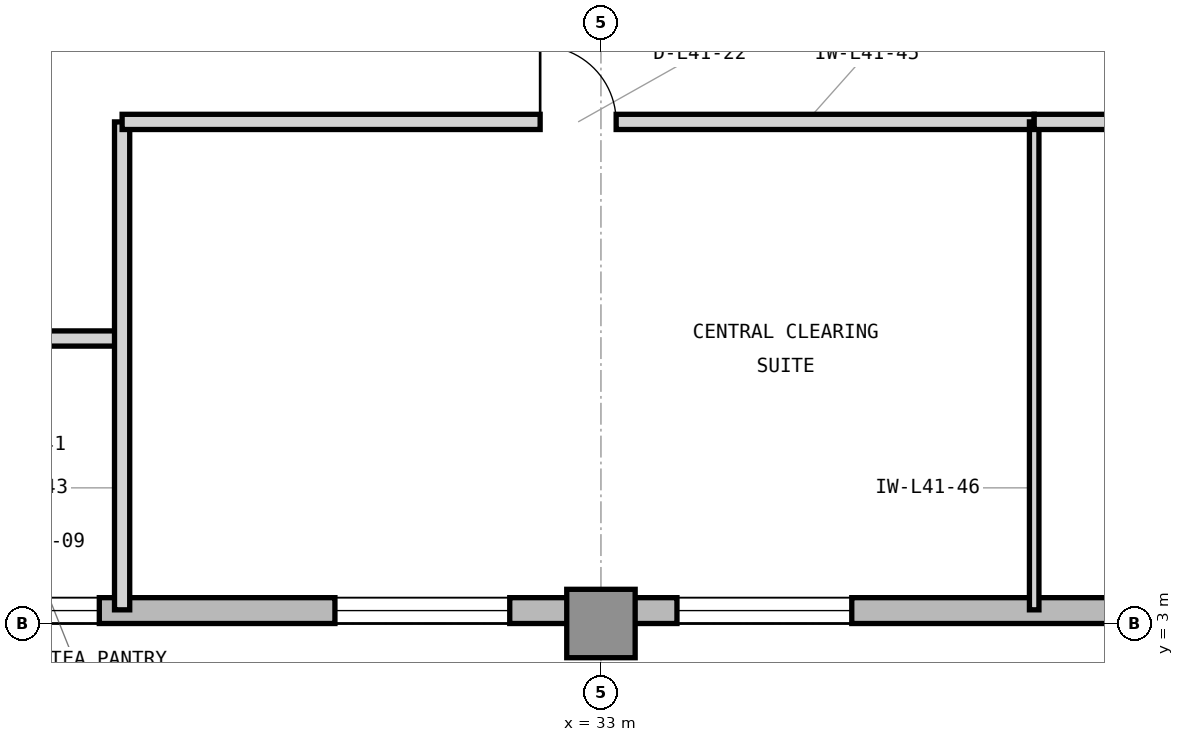
"""IFC4 building model, lengths in metres.
Left out: names, types, materials, properties, quantities, classifications, styles, units other than length and angle.
Written with IfcOpenShell. Run it as: python <this file> out.ifc"""

import sys

from ifc_helpers import new_model, si_unit, direction, frame, frame_2d, origin, origin_2d, place, context, subcontext, project, spatial, rectangle, extrude, element, fill, save


model = new_model("IFC4")
c1 = context("Model", 3, precision=1e-05, world=origin(), true_north=direction((0.0, 1.0)))
c2 = subcontext(c1, "Body", "Model", "MODEL_VIEW")
j1 = project(units=[si_unit("LENGTHUNIT", "METRE"), si_unit("PLANEANGLEUNIT", "RADIAN")], contexts=[c1])
p1 = place(None, origin())
s1 = spatial("IfcSite", under=j1, at=p1, CompositionType="ELEMENT")
p2 = place(p1, origin())
s2 = spatial("IfcBuilding", under=s1, at=p2, CompositionType="ELEMENT")
p3 = place(p2, frame((0.0, 0.0, 172.2)))
s3 = spatial("IfcBuildingStorey", under=s2, at=p3, CompositionType="ELEMENT", Elevation=172.2)
p4 = place(p3, frame((33.0, 3.0, 0.0), z_axis=(0.0, 0.0, 1.0), x_axis=(1.0, 0.0, 0.0)))
e1 = element("IfcColumn", 1, at=p4, inside=s3, PredefinedType="COLUMN", context=c2, shape_type="SweptSolid", body=[
    extrude(rectangle(XDim=0.9, YDim=0.9, at=origin_2d()), origin(), (0.0, 0.0, 1.0), 3.9),
])
p5 = place(p3, frame((23.9, 3.17, 0.0), z_axis=(0.0, 0.0, 1.0), x_axis=(1.0, 0.0, 0.0)))
e2 = element("IfcWall", 2, at=p5, inside=s3, PredefinedType="STANDARD", context=c2, shape_type="SweptSolid", body=[
    extrude(rectangle(XDim=31.5, YDim=0.34, at=frame_2d((15.75, 0.0))), origin(), (0.0, 0.0, 1.0), 3.7),
])
p6 = place(p5, frame((5.6, 0.0, 0.9)))
e3 = element("IfcOpeningElement", 3, at=p6, cuts=e2, PredefinedType="OPENING", context=c2, shape_type="SweptSolid", body=[
    extrude(rectangle(XDim=2.3, YDim=2.2, at=frame_2d((1.15, 1.1))), frame((0.0, 0.18, 0.0), z_axis=(0.0, -1.0, 0.0), x_axis=(1.0, 0.0, 0.0)), (0.0, 0.0, 1.0), 0.36),
])
p7 = place(p5, frame((10.1, 0.0, 0.9)))
e4 = element("IfcOpeningElement", 4, at=p7, cuts=e2, PredefinedType="OPENING", context=c2, shape_type="SweptSolid", body=[
    extrude(rectangle(XDim=2.3, YDim=2.2, at=frame_2d((1.15, 1.1))), frame((0.0, 0.18, 0.0), z_axis=(0.0, -1.0, 0.0), x_axis=(1.0, 0.0, 0.0)), (0.0, 0.0, 1.0), 0.36),
])
p8 = place(p5, frame((19.1, 0.0, 0.9)))
e5 = element("IfcOpeningElement", 5, at=p8, cuts=e2, PredefinedType="OPENING", context=c2, shape_type="SweptSolid", body=[
    extrude(rectangle(XDim=2.3, YDim=2.2, at=frame_2d((1.15, 1.1))), frame((0.0, 0.18, 0.0), z_axis=(0.0, -1.0, 0.0), x_axis=(1.0, 0.0, 0.0)), (0.0, 0.0, 1.0), 0.36),
])
p9 = place(p5, frame((0.9, 0.0, 0.9)))
e6 = element("IfcOpeningElement", 6, at=p9, cuts=e2, PredefinedType="OPENING", context=c2, shape_type="SweptSolid", body=[
    extrude(rectangle(XDim=1.6, YDim=2.2, at=frame_2d((0.8, 1.1))), frame((0.0, 0.18, 0.0), z_axis=(0.0, -1.0, 0.0), x_axis=(1.0, 0.0, 0.0)), (0.0, 0.0, 1.0), 0.36),
])
p10 = place(p3, frame((23.85, 6.75, 0.0), z_axis=(0.0, 0.0, 1.0), x_axis=(1.0, 0.0, 0.0)))
e7 = element("IfcWall", 7, at=p10, inside=s3, PredefinedType="PARTITIONING", context=c2, shape_type="SweptSolid", body=[
    extrude(rectangle(XDim=2.85, YDim=0.2, at=frame_2d((1.425, 0.0))), origin(), (0.0, 0.0, 1.0), 3.69),
])
p11 = place(p10, frame((0.7, 0.0, 0.0)))
e8 = element("IfcOpeningElement", 8, at=p11, cuts=e7, PredefinedType="OPENING", context=c2, shape_type="SweptSolid", body=[
    extrude(rectangle(XDim=1.0, YDim=2.15, at=frame_2d((0.5, 1.075))), frame((0.0, 0.11, 0.0), z_axis=(0.0, -1.0, 0.0), x_axis=(1.0, 0.0, 0.0)), (0.0, 0.0, 1.0), 0.22),
])
p12 = place(p3, frame((26.7, 3.18, 0.0), z_axis=(0.0, 0.0, 1.0), x_axis=(0.0, 1.0, 0.0)))
e9 = element("IfcWall", 9, at=p12, inside=s3, PredefinedType="PARTITIONING", context=c2, shape_type="SweptSolid", body=[
    extrude(rectangle(XDim=6.42, YDim=0.2, at=frame_2d((3.21, 0.0))), origin(), (0.0, 0.0, 1.0), 3.69),
])
p13 = place(p3, frame((26.7, 9.6, 0.0), z_axis=(0.0, 0.0, 1.0), x_axis=(1.0, 0.0, 0.0)))
e10 = element("IfcWall", 10, at=p13, inside=s3, PredefinedType="PARTITIONING", context=c2, shape_type="SweptSolid", body=[
    extrude(rectangle(XDim=12.0, YDim=0.2, at=frame_2d((6.0, 0.0))), origin(), (0.0, 0.0, 1.0), 3.69),
])
p14 = place(p13, frame((5.5, 0.0, 0.0)))
e11 = element("IfcOpeningElement", 11, at=p14, cuts=e10, PredefinedType="OPENING", context=c2, shape_type="SweptSolid", body=[
    extrude(rectangle(XDim=1.0, YDim=2.15, at=frame_2d((0.5, 1.075))), frame((0.0, 0.11, 0.0), z_axis=(0.0, -1.0, 0.0), x_axis=(1.0, 0.0, 0.0)), (0.0, 0.0, 1.0), 0.22),
])
p15 = place(p3, frame((38.7, 3.18, 0.0), z_axis=(0.0, 0.0, 1.0), x_axis=(0.0, 1.0, 0.0)))
e12 = element("IfcWall", 12, at=p15, inside=s3, PredefinedType="PARTITIONING", context=c2, shape_type="SweptSolid", body=[
    extrude(rectangle(XDim=6.42, YDim=0.125, at=frame_2d((3.21, 0.0))), origin(), (0.0, 0.0, 1.0), 3.69),
])
p16 = place(p3, frame((38.7, 9.6, 0.0), z_axis=(0.0, 0.0, 1.0), x_axis=(1.0, 0.0, 0.0)))
e13 = element("IfcWall", 13, at=p16, inside=s3, PredefinedType="PARTITIONING", context=c2, shape_type="SweptSolid", body=[
    extrude(rectangle(XDim=11.3, YDim=0.2, at=frame_2d((5.65, 0.0))), origin(), (0.0, 0.0, 1.0), 3.69),
])
p17 = place(p16, frame((4.9, 0.0, 0.0)))
e14 = element("IfcOpeningElement", 14, at=p17, cuts=e13, PredefinedType="OPENING", context=c2, shape_type="SweptSolid", body=[
    extrude(rectangle(XDim=1.5, YDim=2.3, at=frame_2d((0.75, 1.15))), frame((0.0, 0.11, 0.0), z_axis=(0.0, -1.0, 0.0), x_axis=(1.0, 0.0, 0.0)), (0.0, 0.0, 1.0), 0.22),
])
p18 = place(p6, origin())
e15 = element("IfcWindow", 15, at=p18, inside=s3, PartitioningType="SINGLE_PANEL", PredefinedType="WINDOW", context=c2, shape_type="SweptSolid", body=[
    extrude(rectangle(XDim=2.3, YDim=2.2, at=frame_2d((1.15, 1.1))), frame((0.0, 0.11, 0.0), z_axis=(0.0, -1.0, 0.0), x_axis=(1.0, 0.0, 0.0)), (0.0, 0.0, 1.0), 0.06),
])
fill(e3, e15)
p19 = place(p7, origin())
e16 = element("IfcWindow", 16, at=p19, inside=s3, PartitioningType="SINGLE_PANEL", PredefinedType="WINDOW", context=c2, shape_type="SweptSolid", body=[
    extrude(rectangle(XDim=2.3, YDim=2.2, at=frame_2d((1.15, 1.1))), frame((0.0, 0.11, 0.0), z_axis=(0.0, -1.0, 0.0), x_axis=(1.0, 0.0, 0.0)), (0.0, 0.0, 1.0), 0.06),
])
fill(e4, e16)
p20 = place(p14, origin())
e17 = element("IfcDoor", 17, at=p20, inside=s3, OperationType="SINGLE_SWING_LEFT", PredefinedType="DOOR", context=c2, shape_type="SweptSolid", body=[
    extrude(rectangle(XDim=1.0, YDim=2.15, at=frame_2d((0.5, 1.075))), frame((0.0, 0.025, 0.0), z_axis=(0.0, -1.0, 0.0), x_axis=(1.0, 0.0, 0.0)), (0.0, 0.0, 1.0), 0.05),
])
fill(e11, e17)
p21 = place(p9, origin())
e18 = element("IfcWindow", 18, at=p21, inside=s3, PartitioningType="SINGLE_PANEL", PredefinedType="WINDOW", context=c2, shape_type="SweptSolid", body=[
    extrude(rectangle(XDim=1.6, YDim=2.2, at=frame_2d((0.8, 1.1))), frame((0.0, 0.11, 0.0), z_axis=(0.0, -1.0, 0.0), x_axis=(1.0, 0.0, 0.0)), (0.0, 0.0, 1.0), 0.06),
])
fill(e6, e18)
save(model, sys.argv[1])
